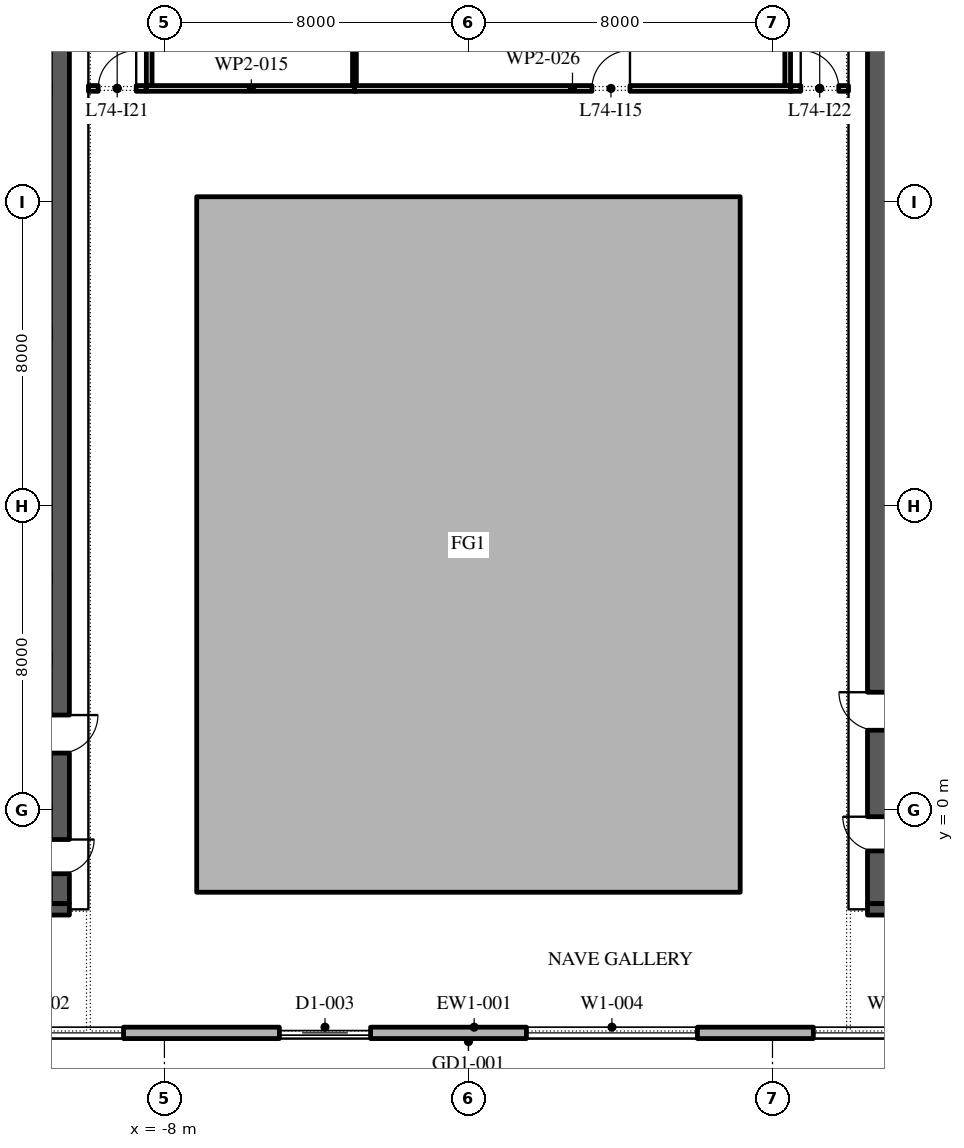
"""IFC4 building model, lengths in metres.
Left out: names, types, materials, properties, quantities, classifications, styles, units other than length and angle.
Written with IfcOpenShell. Run it as: python <this file> out.ifc"""

import sys

from ifc_helpers import new_model, si_unit, direction, frame, frame_2d, origin, place, context, subcontext, project, spatial, polyline, rectangle, outline, extrude, element, fill, save


model = new_model("IFC4")
c1 = context("Model", 3, precision=1e-05, world=origin(), true_north=direction((0.0, 1.0)))
c2 = subcontext(c1, "Body", "Model", "MODEL_VIEW")
j1 = project(units=[si_unit("LENGTHUNIT", "METRE"), si_unit("PLANEANGLEUNIT", "RADIAN")], contexts=[c1])
p1 = place(None, origin())
s1 = spatial("IfcSite", under=j1, at=p1, CompositionType="ELEMENT")
p2 = place(p1, origin())
s2 = spatial("IfcBuilding", under=s1, at=p2, CompositionType="ELEMENT")
p3 = place(p2, frame((0.0, 0.0, 338.4)))
s3 = spatial("IfcBuildingStorey", under=s2, at=p3, CompositionType="ELEMENT", Elevation=338.4)
p4 = place(p3, origin())
e1 = element("IfcWall", 1, at=p4, inside=s3, PredefinedType="STANDARD", context=c2, shape_type="SweptSolid", body=[
    extrude(outline(polyline([(-7.15, -2.15), (7.15, -2.15), (7.15, 16.15), (-7.15, 16.15), (-7.15, -2.15)]), holes=[polyline([(-7.0, -2.0), (-7.0, 16.0), (7.0, 16.0), (7.0, -2.0), (-7.0, -2.0)])]), origin(), (0.0, 0.0, 1.0), 4.0),
])
p5 = place(p3, frame((-22.35, -5.85, 0.0), z_axis=(0.0, 0.0, 1.0), x_axis=(1.0, 0.0, 0.0)))
e2 = element("IfcWall", 2, at=p5, inside=s3, PredefinedType="STANDARD", context=c2, shape_type="SweptSolid", body=[
    extrude(rectangle(XDim=45.0, YDim=0.3, at=frame_2d((22.5, 0.0))), origin(), (0.0, 0.0, 1.0), 4.0),
])
p6 = place(p5, frame((1.375, 0.0, 0.45)))
e3 = element("IfcOpeningElement", 3, at=p6, cuts=e2, PredefinedType="OPENING", context=c2, shape_type="SweptSolid", body=[
    extrude(rectangle(XDim=4.5, YDim=3.05, at=frame_2d((2.25, 1.525))), frame((0.0, 0.16, 0.0), z_axis=(0.0, -1.0, 0.0), x_axis=(1.0, 0.0, 0.0)), (0.0, 0.0, 1.0), 0.32),
])
p7 = place(p5, frame((8.775, 0.0, 0.45)))
e4 = element("IfcOpeningElement", 4, at=p7, cuts=e2, PredefinedType="OPENING", context=c2, shape_type="SweptSolid", body=[
    extrude(rectangle(XDim=4.5, YDim=3.05, at=frame_2d((2.25, 1.525))), frame((0.0, 0.16, 0.0), z_axis=(0.0, -1.0, 0.0), x_axis=(1.0, 0.0, 0.0)), (0.0, 0.0, 1.0), 0.32),
])
p8 = place(p5, frame((17.375, 0.0, 0.0)))
e5 = element("IfcOpeningElement", 5, at=p8, cuts=e2, PredefinedType="OPENING", context=c2, shape_type="SweptSolid", body=[
    extrude(rectangle(XDim=2.4, YDim=3.5, at=frame_2d((1.2, 1.75))), frame((0.0, 0.16, 0.0), z_axis=(0.0, -1.0, 0.0), x_axis=(1.0, 0.0, 0.0)), (0.0, 0.0, 1.0), 0.32),
])
p9 = place(p5, frame((23.875, 0.0, 0.45)))
e6 = element("IfcOpeningElement", 6, at=p9, cuts=e2, PredefinedType="OPENING", context=c2, shape_type="SweptSolid", body=[
    extrude(rectangle(XDim=4.5, YDim=3.05, at=frame_2d((2.25, 1.525))), frame((0.0, 0.16, 0.0), z_axis=(0.0, -1.0, 0.0), x_axis=(1.0, 0.0, 0.0)), (0.0, 0.0, 1.0), 0.32),
])
p10 = place(p5, frame((31.425, 0.0, 0.45)))
e7 = element("IfcOpeningElement", 7, at=p10, cuts=e2, PredefinedType="OPENING", context=c2, shape_type="SweptSolid", body=[
    extrude(rectangle(XDim=4.5, YDim=3.05, at=frame_2d((2.25, 1.525))), frame((0.0, 0.16, 0.0), z_axis=(0.0, -1.0, 0.0), x_axis=(1.0, 0.0, 0.0)), (0.0, 0.0, 1.0), 0.32),
])
p11 = place(p5, frame((38.975, 0.0, 0.45)))
e8 = element("IfcOpeningElement", 8, at=p11, cuts=e2, PredefinedType="OPENING", context=c2, shape_type="SweptSolid", body=[
    extrude(rectangle(XDim=4.5, YDim=3.05, at=frame_2d((2.25, 1.525))), frame((0.0, 0.16, 0.0), z_axis=(0.0, -1.0, 0.0), x_axis=(1.0, 0.0, 0.0)), (0.0, 0.0, 1.0), 0.32),
])
p12 = place(p3, frame((-10.75, -2.45, 0.0), z_axis=(0.0, 0.0, 1.0), x_axis=(0.0, 1.0, 0.0)))
e9 = element("IfcWall", 9, at=p12, inside=s3, PredefinedType="SHEAR", context=c2, shape_type="SweptSolid", body=[
    extrude(rectangle(XDim=27.9, YDim=0.5, at=frame_2d((13.95, 0.0))), origin(), (0.0, 0.0, 1.0), 4.0),
])
p13 = place(p12, frame((23.65, 0.0, 0.0)))
e10 = element("IfcOpeningElement", 10, at=p13, cuts=e9, PredefinedType="OPENING", context=c2, shape_type="SweptSolid", body=[
    extrude(rectangle(XDim=2.4, YDim=2.1, at=frame_2d((1.2, 1.05))), frame((0.0, 0.26, 0.0), z_axis=(0.0, -1.0, 0.0), x_axis=(1.0, 0.0, 0.0)), (0.0, 0.0, 1.0), 0.52),
])
p14 = place(p12, frame((0.788, 0.0, 0.0)))
e11 = element("IfcOpeningElement", 11, at=p14, cuts=e9, PredefinedType="OPENING", context=c2, shape_type="SweptSolid", body=[
    extrude(rectangle(XDim=0.9, YDim=2.1, at=frame_2d((0.45, 1.05))), frame((0.0, 0.26, 0.0), z_axis=(0.0, -1.0, 0.0), x_axis=(1.0, 0.0, 0.0)), (0.0, 0.0, 1.0), 0.52),
])
p15 = place(p12, frame((3.962, 0.0, 0.0)))
e12 = element("IfcOpeningElement", 12, at=p15, cuts=e9, PredefinedType="OPENING", context=c2, shape_type="SweptSolid", body=[
    extrude(rectangle(XDim=1.0, YDim=2.1, at=frame_2d((0.5, 1.05))), frame((0.0, 0.26, 0.0), z_axis=(0.0, -1.0, 0.0), x_axis=(1.0, 0.0, 0.0)), (0.0, 0.0, 1.0), 0.52),
])
p16 = place(p3, frame((-21.5, -2.6, 0.0), z_axis=(0.0, 0.0, 1.0), x_axis=(1.0, 0.0, 0.0)))
e13 = element("IfcWall", 13, at=p16, inside=s3, PredefinedType="SHEAR", context=c2, shape_type="SweptSolid", body=[
    extrude(rectangle(XDim=11.0, YDim=0.3, at=frame_2d((5.5, 0.0))), origin(), (0.0, 0.0, 1.0), 4.0),
])
p17 = place(p3, frame((10.75, -2.45, 0.0), z_axis=(0.0, 0.0, 1.0), x_axis=(0.0, 1.0, 0.0)))
e14 = element("IfcWall", 14, at=p17, inside=s3, PredefinedType="SHEAR", context=c2, shape_type="SweptSolid", body=[
    extrude(rectangle(XDim=27.9, YDim=0.5, at=frame_2d((13.95, 0.0))), origin(), (0.0, 0.0, 1.0), 4.0),
])
p18 = place(p17, frame((23.65, 0.0, 0.0)))
e15 = element("IfcOpeningElement", 15, at=p18, cuts=e14, PredefinedType="OPENING", context=c2, shape_type="SweptSolid", body=[
    extrude(rectangle(XDim=2.4, YDim=2.1, at=frame_2d((1.2, 1.05))), frame((0.0, 0.26, 0.0), z_axis=(0.0, -1.0, 0.0), x_axis=(1.0, 0.0, 0.0)), (0.0, 0.0, 1.0), 0.52),
])
p19 = place(p17, frame((1.387, 0.0, 0.0)))
e16 = element("IfcOpeningElement", 16, at=p19, cuts=e14, PredefinedType="OPENING", context=c2, shape_type="SweptSolid", body=[
    extrude(rectangle(XDim=0.9, YDim=2.1, at=frame_2d((0.45, 1.05))), frame((0.0, 0.26, 0.0), z_axis=(0.0, -1.0, 0.0), x_axis=(1.0, 0.0, 0.0)), (0.0, 0.0, 1.0), 0.52),
])
p20 = place(p17, frame((4.562, 0.0, 0.0)))
e17 = element("IfcOpeningElement", 17, at=p20, cuts=e14, PredefinedType="OPENING", context=c2, shape_type="SweptSolid", body=[
    extrude(rectangle(XDim=1.0, YDim=2.1, at=frame_2d((0.5, 1.05))), frame((0.0, 0.26, 0.0), z_axis=(0.0, -1.0, 0.0), x_axis=(1.0, 0.0, 0.0)), (0.0, 0.0, 1.0), 0.52),
])
p21 = place(p3, frame((10.5, -2.6, 0.0), z_axis=(0.0, 0.0, 1.0), x_axis=(1.0, 0.0, 0.0)))
e18 = element("IfcWall", 18, at=p21, inside=s3, PredefinedType="SHEAR", context=c2, shape_type="SweptSolid", body=[
    extrude(rectangle(XDim=11.0, YDim=0.3, at=frame_2d((5.5, 0.0))), origin(), (0.0, 0.0, 1.0), 4.0),
])
p22 = place(p3, frame((-8.475, 19.0, 0.0), z_axis=(0.0, 0.0, 1.0), x_axis=(1.0, 0.0, 0.0)))
e19 = element("IfcWall", 19, at=p22, inside=s3, PredefinedType="PARTITIONING", context=c2, shape_type="SweptSolid", body=[
    extrude(rectangle(XDim=5.525, YDim=0.15, at=frame_2d((2.763, 0.0))), origin(), (0.0, 0.0, 1.0), 4.0),
])
p23 = place(p3, frame((-8.4, 32.05, 0.0), z_axis=(0.0, 0.0, 1.0), x_axis=(0.0, -1.0, 0.0)))
e20 = element("IfcWall", 20, at=p23, inside=s3, PredefinedType="PARTITIONING", context=c2, shape_type="SweptSolid", body=[
    extrude(rectangle(XDim=12.975, YDim=0.15, at=frame_2d((6.488, 0.0))), origin(), (0.0, 0.0, 1.0), 4.0),
])
p24 = place(p23, frame((3.4, 0.0, 0.0)))
e21 = element("IfcOpeningElement", 21, at=p24, cuts=e20, PredefinedType="OPENING", context=c2, shape_type="SweptSolid", body=[
    extrude(rectangle(XDim=1.0, YDim=2.1, at=frame_2d((0.5, 1.05))), frame((0.0, 0.085, 0.0), z_axis=(0.0, -1.0, 0.0), x_axis=(1.0, 0.0, 0.0)), (0.0, 0.0, 1.0), 0.17),
])
p25 = place(p3, frame((-3.0, 19.075, 0.0), z_axis=(0.0, 0.0, 1.0), x_axis=(0.0, 1.0, 0.0)))
e22 = element("IfcWall", 22, at=p25, inside=s3, PredefinedType="PARTITIONING", context=c2, shape_type="SweptSolid", body=[
    extrude(rectangle(XDim=4.875, YDim=0.1, at=frame_2d((2.438, 0.0))), origin(), (0.0, 0.0, 1.0), 4.0),
])
p26 = place(p3, frame((-3.0, 19.0, 0.0), z_axis=(0.0, 0.0, 1.0), x_axis=(1.0, 0.0, 0.0)))
e23 = element("IfcWall", 23, at=p26, inside=s3, PredefinedType="PARTITIONING", context=c2, shape_type="SweptSolid", body=[
    extrude(rectangle(XDim=11.475, YDim=0.15, at=frame_2d((5.738, 0.0))), origin(), (0.0, 0.0, 1.0), 4.0),
])
p27 = place(p26, frame((6.25, 0.0, 0.0)))
e24 = element("IfcOpeningElement", 24, at=p27, cuts=e23, PredefinedType="OPENING", context=c2, shape_type="SweptSolid", body=[
    extrude(rectangle(XDim=1.0, YDim=2.1, at=frame_2d((0.5, 1.05))), frame((0.0, 0.085, 0.0), z_axis=(0.0, -1.0, 0.0), x_axis=(1.0, 0.0, 0.0)), (0.0, 0.0, 1.0), 0.17),
])
p28 = place(p3, frame((8.4, 19.075, 0.0), z_axis=(0.0, 0.0, 1.0), x_axis=(0.0, 1.0, 0.0)))
e25 = element("IfcWall", 25, at=p28, inside=s3, PredefinedType="PARTITIONING", context=c2, shape_type="SweptSolid", body=[
    extrude(rectangle(XDim=4.875, YDim=0.15, at=frame_2d((2.438, 0.0))), origin(), (0.0, 0.0, 1.0), 4.0),
])
p29 = place(p3, frame((-10.0, 19.0, 0.0), z_axis=(0.0, 0.0, 1.0), x_axis=(1.0, 0.0, 0.0)))
e26 = element("IfcWall", 26, at=p29, inside=s3, PredefinedType="PARTITIONING", context=c2, shape_type="SweptSolid", body=[
    extrude(rectangle(XDim=1.515, YDim=0.15, at=frame_2d((0.757, 0.0))), origin(), (0.0, 0.0, 1.0), 4.0),
])
p30 = place(p29, frame((0.258, 0.0, 0.0)))
e27 = element("IfcOpeningElement", 27, at=p30, cuts=e26, PredefinedType="OPENING", context=c2, shape_type="SweptSolid", body=[
    extrude(rectangle(XDim=1.0, YDim=2.1, at=frame_2d((0.5, 1.05))), frame((0.0, 0.085, 0.0), z_axis=(0.0, -1.0, 0.0), x_axis=(1.0, 0.0, 0.0)), (0.0, 0.0, 1.0), 0.17),
])
p31 = place(p3, frame((8.485, 19.0, 0.0), z_axis=(0.0, 0.0, 1.0), x_axis=(1.0, 0.0, 0.0)))
e28 = element("IfcWall", 28, at=p31, inside=s3, PredefinedType="PARTITIONING", context=c2, shape_type="SweptSolid", body=[
    extrude(rectangle(XDim=1.515, YDim=0.15, at=frame_2d((0.757, 0.0))), origin(), (0.0, 0.0, 1.0), 4.0),
])
p32 = place(p31, frame((0.258, 0.0, 0.0)))
e29 = element("IfcOpeningElement", 29, at=p32, cuts=e28, PredefinedType="OPENING", context=c2, shape_type="SweptSolid", body=[
    extrude(rectangle(XDim=1.0, YDim=2.1, at=frame_2d((0.5, 1.05))), frame((0.0, 0.085, 0.0), z_axis=(0.0, -1.0, 0.0), x_axis=(1.0, 0.0, 0.0)), (0.0, 0.0, 1.0), 0.17),
])
p33 = place(p7, origin())
e30 = element("IfcWindow", 30, at=p33, inside=s3, PartitioningType="DOUBLE_PANEL_VERTICAL", PredefinedType="WINDOW", context=c2, shape_type="SweptSolid", body=[
    extrude(rectangle(XDim=4.5, YDim=3.05, at=frame_2d((2.25, 1.525))), frame((0.0, 0.03, 0.0), z_axis=(0.0, -1.0, 0.0), x_axis=(1.0, 0.0, 0.0)), (0.0, 0.0, 1.0), 0.06),
])
fill(e4, e30)
p34 = place(p8, origin())
e31 = element("IfcDoor", 31, at=p34, inside=s3, OperationType="DOUBLE_DOOR_SLIDING", PredefinedType="DOOR", context=c2, shape_type="SweptSolid", body=[
    extrude(rectangle(XDim=2.4, YDim=3.5, at=frame_2d((1.2, 1.75))), frame((0.0, 0.025, 0.0), z_axis=(0.0, -1.0, 0.0), x_axis=(1.0, 0.0, 0.0)), (0.0, 0.0, 1.0), 0.05),
])
fill(e5, e31)
p35 = place(p9, origin())
e32 = element("IfcWindow", 32, at=p35, inside=s3, PartitioningType="DOUBLE_PANEL_VERTICAL", PredefinedType="WINDOW", context=c2, shape_type="SweptSolid", body=[
    extrude(rectangle(XDim=4.5, YDim=3.05, at=frame_2d((2.25, 1.525))), frame((0.0, 0.03, 0.0), z_axis=(0.0, -1.0, 0.0), x_axis=(1.0, 0.0, 0.0)), (0.0, 0.0, 1.0), 0.06),
])
fill(e6, e32)
p36 = place(p10, origin())
e33 = element("IfcWindow", 33, at=p36, inside=s3, PartitioningType="DOUBLE_PANEL_VERTICAL", PredefinedType="WINDOW", context=c2, shape_type="SweptSolid", body=[
    extrude(rectangle(XDim=4.5, YDim=3.05, at=frame_2d((2.25, 1.525))), frame((0.0, 0.03, 0.0), z_axis=(0.0, -1.0, 0.0), x_axis=(1.0, 0.0, 0.0)), (0.0, 0.0, 1.0), 0.06),
])
fill(e7, e33)
p37 = place(p27, origin())
e34 = element("IfcDoor", 34, at=p37, inside=s3, OperationType="SINGLE_SWING_LEFT", PredefinedType="DOOR", context=c2, shape_type="SweptSolid", body=[
    extrude(rectangle(XDim=1.0, YDim=2.1, at=frame_2d((0.5, 1.05))), frame((0.0, 0.025, 0.0), z_axis=(0.0, -1.0, 0.0), x_axis=(1.0, 0.0, 0.0)), (0.0, 0.0, 1.0), 0.05),
])
fill(e24, e34)
p38 = place(p30, origin())
e35 = element("IfcDoor", 35, at=p38, inside=s3, OperationType="SINGLE_SWING_LEFT", PredefinedType="DOOR", context=c2, shape_type="SweptSolid", body=[
    extrude(rectangle(XDim=1.0, YDim=2.1, at=frame_2d((0.5, 1.05))), frame((0.0, 0.025, 0.0), z_axis=(0.0, -1.0, 0.0), x_axis=(1.0, 0.0, 0.0)), (0.0, 0.0, 1.0), 0.05),
])
fill(e27, e35)
p39 = place(p32, origin())
e36 = element("IfcDoor", 36, at=p39, inside=s3, OperationType="SINGLE_SWING_RIGHT", PredefinedType="DOOR", context=c2, shape_type="SweptSolid", body=[
    extrude(rectangle(XDim=1.0, YDim=2.1, at=frame_2d((0.5, 1.05))), frame((0.0, 0.025, 0.0), z_axis=(0.0, -1.0, 0.0), x_axis=(1.0, 0.0, 0.0)), (0.0, 0.0, 1.0), 0.05),
])
fill(e29, e36)
save(model, sys.argv[1])
